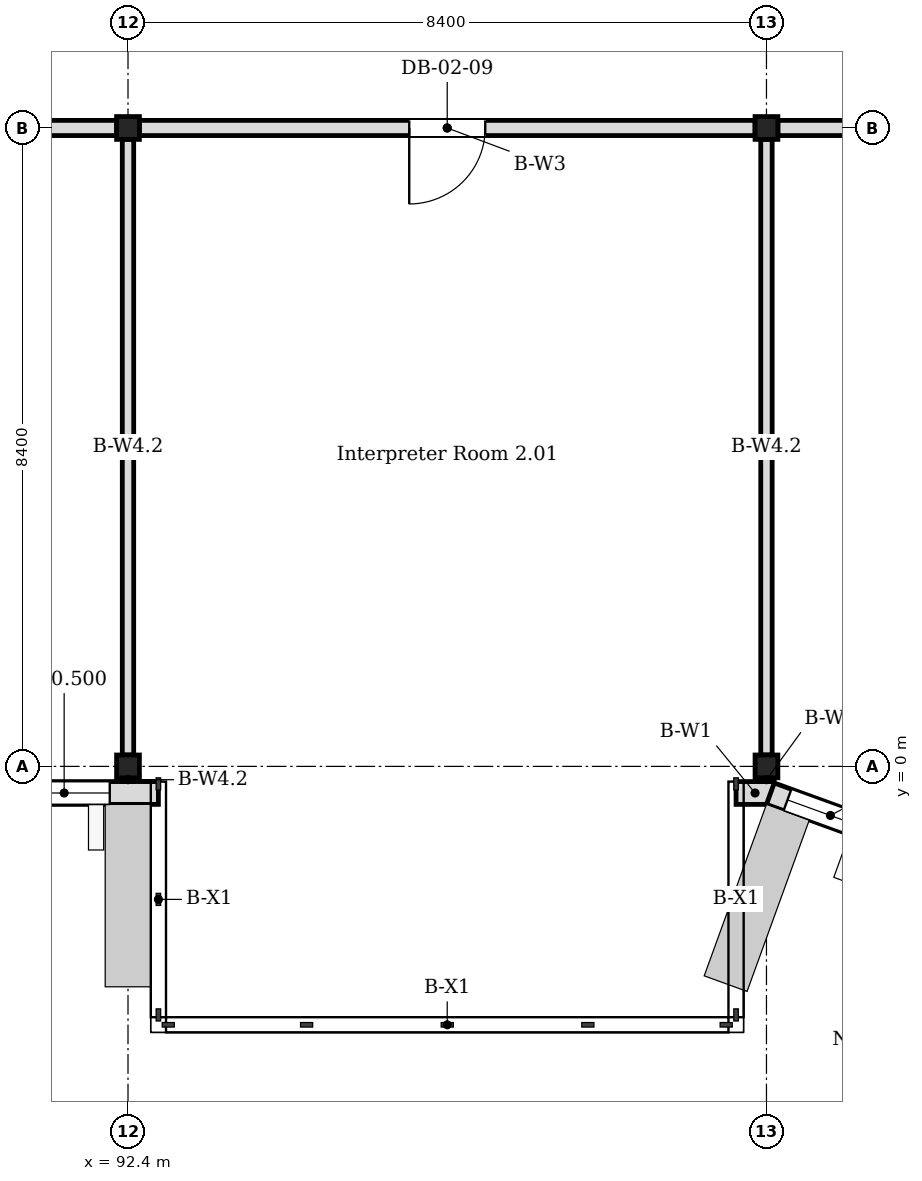
"""IFC4 building model, lengths in metres.
Left out: names, types, materials, properties, quantities, classifications, styles, units other than length and angle.
Written with IfcOpenShell. Run it as: python <this file> out.ifc"""

import sys

from ifc_helpers import new_model, si_unit, direction, frame, frame_2d, origin, origin_2d, place, context, subcontext, project, spatial, rectangle, i_section, extrude, element, fill, save


model = new_model("IFC4")
c1 = context("Model", 3, precision=1e-05, world=origin(), true_north=direction((0.0, 1.0)))
c2 = subcontext(c1, "Body", "Model", "MODEL_VIEW")
j1 = project(units=[si_unit("LENGTHUNIT", "METRE"), si_unit("PLANEANGLEUNIT", "RADIAN")], contexts=[c1])
p1 = place(None, origin())
s1 = spatial("IfcSite", under=j1, at=p1, CompositionType="ELEMENT")
p2 = place(p1, origin())
s2 = spatial("IfcBuilding", under=s1, at=p2, CompositionType="ELEMENT")
p3 = place(p2, frame((0.0, 0.0, 10.2)))
s3 = spatial("IfcBuildingStorey", under=s2, at=p3, CompositionType="ELEMENT", Elevation=10.2)
for number, where, z_axis, x_axis in (
    (1, (92.4, 0.0, 0.0), (0.0, 0.0, 1.0), (1.0, 0.0, 0.0)),
    (2, (92.4, 8.4, 0.0), (0.0, 0.0, 1.0), (1.0, 0.0, 0.0)),
    (3, (100.8, 0.0, 0.0), (0.0, 0.0, 1.0), (1.0, 0.0, 0.0)),
    (4, (100.8, 8.4, 0.0), (0.0, 0.0, 1.0), (1.0, 0.0, 0.0)),
):
    element("IfcColumn", number, at=place(p3, frame(where, z_axis=z_axis, x_axis=x_axis)), inside=s3, PredefinedType="COLUMN", context=c2, shape_type="SweptSolid", body=[
        extrude(i_section(OverallWidth=0.3, OverallDepth=0.3, WebThickness=0.01, FlangeThickness=0.015, FilletRadius=0.013, at=origin_2d()), origin(), (0.0, 0.0, 1.0), 4.2),
    ])
p4 = place(p3, frame((83.6, -0.35, 0.0), z_axis=(0.0, 0.0, 1.0), x_axis=(1.0, 0.0, 0.0)))
e5 = element("IfcWall", 5, at=p4, inside=s3, PredefinedType="SOLIDWALL", context=c2, shape_type="SweptSolid", body=[
    extrude(rectangle(XDim=9.2, YDim=0.3, at=frame_2d((4.6, 0.0))), origin(), (0.0, 0.0, 1.0), 4.05),
])
p5 = place(p4, frame((0.64, 0.0, 0.3)))
e6 = element("IfcOpeningElement", 6, at=p5, cuts=e5, PredefinedType="OPENING", context=c2, shape_type="SweptSolid", body=[
    extrude(rectangle(XDim=1.2, YDim=3.3, at=frame_2d((0.6, 1.65))), frame((0.0, 0.16, 0.0), z_axis=(0.0, -1.0, 0.0), x_axis=(1.0, 0.0, 0.0)), (0.0, 0.0, 1.0), 0.32),
])
p6 = place(p4, frame((2.32, 0.0, 0.3)))
e7 = element("IfcOpeningElement", 7, at=p6, cuts=e5, PredefinedType="OPENING", context=c2, shape_type="SweptSolid", body=[
    extrude(rectangle(XDim=1.2, YDim=3.3, at=frame_2d((0.6, 1.65))), frame((0.0, 0.16, 0.0), z_axis=(0.0, -1.0, 0.0), x_axis=(1.0, 0.0, 0.0)), (0.0, 0.0, 1.0), 0.32),
])
p7 = place(p4, frame((4.0, 0.0, 0.3)))
e8 = element("IfcOpeningElement", 8, at=p7, cuts=e5, PredefinedType="OPENING", context=c2, shape_type="SweptSolid", body=[
    extrude(rectangle(XDim=1.2, YDim=3.3, at=frame_2d((0.6, 1.65))), frame((0.0, 0.16, 0.0), z_axis=(0.0, -1.0, 0.0), x_axis=(1.0, 0.0, 0.0)), (0.0, 0.0, 1.0), 0.32),
])
p8 = place(p4, frame((5.68, 0.0, 0.3)))
e9 = element("IfcOpeningElement", 9, at=p8, cuts=e5, PredefinedType="OPENING", context=c2, shape_type="SweptSolid", body=[
    extrude(rectangle(XDim=1.2, YDim=3.3, at=frame_2d((0.6, 1.65))), frame((0.0, 0.16, 0.0), z_axis=(0.0, -1.0, 0.0), x_axis=(1.0, 0.0, 0.0)), (0.0, 0.0, 1.0), 0.32),
])
p9 = place(p4, frame((7.36, 0.0, 0.3)))
e10 = element("IfcOpeningElement", 10, at=p9, cuts=e5, PredefinedType="OPENING", context=c2, shape_type="SweptSolid", body=[
    extrude(rectangle(XDim=1.2, YDim=3.3, at=frame_2d((0.6, 1.65))), frame((0.0, 0.16, 0.0), z_axis=(0.0, -1.0, 0.0), x_axis=(1.0, 0.0, 0.0)), (0.0, 0.0, 1.0), 0.32),
])
p10 = place(p3, frame((100.4, -0.35, 0.0), z_axis=(0.0, 0.0, 1.0), x_axis=(1.0, 0.0, 0.0)))
e11 = element("IfcWall", 11, at=p10, inside=s3, PredefinedType="SOLIDWALL", context=c2, shape_type="SweptSolid", body=[
    extrude(rectangle(XDim=0.5, YDim=0.3, at=frame_2d((0.25, 0.0))), origin(), (0.0, 0.0, 1.0), 4.05),
])
p11 = place(p3, frame((100.851, -0.359, 0.0), z_axis=(0.0, 0.0, 1.0), x_axis=(0.939953187971, -0.341303390584, 0.0)))
e12 = element("IfcWall", 12, at=p11, inside=s3, PredefinedType="SOLIDWALL", context=c2, shape_type="SweptSolid", body=[
    extrude(rectangle(XDim=8.828, YDim=0.3, at=frame_2d((4.414, 0.0))), origin(), (0.0, 0.0, 1.0), 4.05),
])
p12 = place(p11, frame((0.24, 0.0, 0.3)))
e13 = element("IfcOpeningElement", 13, at=p12, cuts=e12, PredefinedType="OPENING", context=c2, shape_type="SweptSolid", body=[
    extrude(rectangle(XDim=1.2, YDim=3.3, at=frame_2d((0.6, 1.65))), frame((0.0, 0.16, 0.0), z_axis=(0.0, -1.0, 0.0), x_axis=(1.0, 0.0, 0.0)), (0.0, 0.0, 1.0), 0.32),
])
p13 = place(p11, frame((1.92, 0.0, 0.3)))
e14 = element("IfcOpeningElement", 14, at=p13, cuts=e12, PredefinedType="OPENING", context=c2, shape_type="SweptSolid", body=[
    extrude(rectangle(XDim=1.2, YDim=3.3, at=frame_2d((0.6, 1.65))), frame((0.0, 0.16, 0.0), z_axis=(0.0, -1.0, 0.0), x_axis=(1.0, 0.0, 0.0)), (0.0, 0.0, 1.0), 0.32),
])
p14 = place(p11, frame((3.6, 0.0, 0.3)))
e15 = element("IfcOpeningElement", 15, at=p14, cuts=e12, PredefinedType="OPENING", context=c2, shape_type="SweptSolid", body=[
    extrude(rectangle(XDim=1.2, YDim=3.3, at=frame_2d((0.6, 1.65))), frame((0.0, 0.16, 0.0), z_axis=(0.0, -1.0, 0.0), x_axis=(1.0, 0.0, 0.0)), (0.0, 0.0, 1.0), 0.32),
])
p15 = place(p11, frame((5.28, 0.0, 0.3)))
e16 = element("IfcOpeningElement", 16, at=p15, cuts=e12, PredefinedType="OPENING", context=c2, shape_type="SweptSolid", body=[
    extrude(rectangle(XDim=1.2, YDim=3.3, at=frame_2d((0.6, 1.65))), frame((0.0, 0.16, 0.0), z_axis=(0.0, -1.0, 0.0), x_axis=(1.0, 0.0, 0.0)), (0.0, 0.0, 1.0), 0.32),
])
p16 = place(p11, frame((6.96, 0.0, 0.3)))
e17 = element("IfcOpeningElement", 17, at=p16, cuts=e12, PredefinedType="OPENING", context=c2, shape_type="SweptSolid", body=[
    extrude(rectangle(XDim=1.2, YDim=3.3, at=frame_2d((0.6, 1.65))), frame((0.0, 0.16, 0.0), z_axis=(0.0, -1.0, 0.0), x_axis=(1.0, 0.0, 0.0)), (0.0, 0.0, 1.0), 0.32),
])
p17 = place(p3, frame((84.15, 8.4, 0.0), z_axis=(0.0, 0.0, 1.0), x_axis=(1.0, 0.0, 0.0)))
e18 = element("IfcWall", 18, at=p17, inside=s3, PredefinedType="PARTITIONING", context=c2, shape_type="SweptSolid", body=[
    extrude(rectangle(XDim=8.1, YDim=0.2, at=frame_2d((4.05, 0.0))), origin(), (0.0, 0.0, 1.0), 3.35),
])
p18 = place(p17, frame((2.85, 0.0, 0.0)))
e19 = element("IfcOpeningElement", 19, at=p18, cuts=e18, PredefinedType="OPENING", context=c2, shape_type="SweptSolid", body=[
    extrude(rectangle(XDim=2.4, YDim=2.2, at=frame_2d((1.2, 1.1))), frame((0.0, 0.11, 0.0), z_axis=(0.0, -1.0, 0.0), x_axis=(1.0, 0.0, 0.0)), (0.0, 0.0, 1.0), 0.22),
])
p19 = place(p3, frame((92.55, 8.4, 0.0), z_axis=(0.0, 0.0, 1.0), x_axis=(1.0, 0.0, 0.0)))
e20 = element("IfcWall", 20, at=p19, inside=s3, PredefinedType="PARTITIONING", context=c2, shape_type="SweptSolid", body=[
    extrude(rectangle(XDim=8.1, YDim=0.2, at=frame_2d((4.05, 0.0))), origin(), (0.0, 0.0, 1.0), 3.35),
])
p20 = place(p19, frame((3.55, 0.0, 0.0)))
e21 = element("IfcOpeningElement", 21, at=p20, cuts=e20, PredefinedType="OPENING", context=c2, shape_type="SweptSolid", body=[
    extrude(rectangle(XDim=1.0, YDim=2.1, at=frame_2d((0.5, 1.05))), frame((0.0, 0.11, 0.0), z_axis=(0.0, -1.0, 0.0), x_axis=(1.0, 0.0, 0.0)), (0.0, 0.0, 1.0), 0.22),
])
p21 = place(p3, frame((100.95, 8.4, 0.0), z_axis=(0.0, 0.0, 1.0), x_axis=(1.0, 0.0, 0.0)))
e22 = element("IfcWall", 22, at=p21, inside=s3, PredefinedType="PARTITIONING", context=c2, shape_type="SweptSolid", body=[
    extrude(rectangle(XDim=8.1, YDim=0.2, at=frame_2d((4.05, 0.0))), origin(), (0.0, 0.0, 1.0), 3.35),
])
p22 = place(p21, frame((2.85, 0.0, 0.0)))
e23 = element("IfcOpeningElement", 23, at=p22, cuts=e22, PredefinedType="OPENING", context=c2, shape_type="SweptSolid", body=[
    extrude(rectangle(XDim=2.4, YDim=2.2, at=frame_2d((1.2, 1.1))), frame((0.0, 0.11, 0.0), z_axis=(0.0, -1.0, 0.0), x_axis=(1.0, 0.0, 0.0)), (0.0, 0.0, 1.0), 0.22),
])
p23 = place(p3, frame((92.4, -0.2, 0.0), z_axis=(0.0, 0.0, 1.0), x_axis=(0.0, 1.0, 0.0)))
e24 = element("IfcWall", 24, at=p23, inside=s3, PredefinedType="PARTITIONING", context=c2, shape_type="SweptSolid", body=[
    extrude(rectangle(XDim=0.05, YDim=0.15, at=frame_2d((0.025, 0.0))), origin(), (0.0, 0.0, 1.0), 3.35),
])
p24 = place(p3, frame((92.4, 0.15, 0.0), z_axis=(0.0, 0.0, 1.0), x_axis=(0.0, 1.0, 0.0)))
e25 = element("IfcWall", 25, at=p24, inside=s3, PredefinedType="PARTITIONING", context=c2, shape_type="SweptSolid", body=[
    extrude(rectangle(XDim=8.1, YDim=0.15, at=frame_2d((4.05, 0.0))), origin(), (0.0, 0.0, 1.0), 3.35),
])
p25 = place(p3, frame((100.8, -0.2, 0.0), z_axis=(0.0, 0.0, 1.0), x_axis=(0.0, 1.0, 0.0)))
e26 = element("IfcWall", 26, at=p25, inside=s3, PredefinedType="PARTITIONING", context=c2, shape_type="SweptSolid", body=[
    extrude(rectangle(XDim=0.05, YDim=0.15, at=frame_2d((0.025, 0.0))), origin(), (0.0, 0.0, 1.0), 3.35),
])
p26 = place(p3, frame((100.8, 0.15, 0.0), z_axis=(0.0, 0.0, 1.0), x_axis=(0.0, 1.0, 0.0)))
e27 = element("IfcWall", 27, at=p26, inside=s3, PredefinedType="PARTITIONING", context=c2, shape_type="SweptSolid", body=[
    extrude(rectangle(XDim=8.1, YDim=0.15, at=frame_2d((4.05, 0.0))), origin(), (0.0, 0.0, 1.0), 3.35),
])
p27 = place(p9, origin())
e28 = element("IfcWindow", 28, at=p27, inside=s3, PartitioningType="TRIPLE_PANEL_VERTICAL", PredefinedType="WINDOW", context=c2, shape_type="SweptSolid", body=[
    extrude(rectangle(XDim=1.2, YDim=3.3, at=frame_2d((0.6, 1.65))), frame((0.0, 0.03, 0.0), z_axis=(0.0, -1.0, 0.0), x_axis=(1.0, 0.0, 0.0)), (0.0, 0.0, 1.0), 0.06),
])
fill(e10, e28)
p28 = place(p12, origin())
e29 = element("IfcWindow", 29, at=p28, inside=s3, PartitioningType="TRIPLE_PANEL_VERTICAL", PredefinedType="WINDOW", context=c2, shape_type="SweptSolid", body=[
    extrude(rectangle(XDim=1.2, YDim=3.3, at=frame_2d((0.6, 1.65))), frame((0.0, 0.03, 0.0), z_axis=(0.0, -1.0, 0.0), x_axis=(1.0, 0.0, 0.0)), (0.0, 0.0, 1.0), 0.06),
])
fill(e13, e29)
p29 = place(p20, origin())
e30 = element("IfcDoor", 30, at=p29, inside=s3, OperationType="SINGLE_SWING_LEFT", PredefinedType="DOOR", context=c2, shape_type="SweptSolid", body=[
    extrude(rectangle(XDim=1.0, YDim=2.1, at=frame_2d((0.5, 1.05))), frame((0.0, 0.025, 0.0), z_axis=(0.0, -1.0, 0.0), x_axis=(1.0, 0.0, 0.0)), (0.0, 0.0, 1.0), 0.05),
])
fill(e21, e30)
save(model, sys.argv[1])
